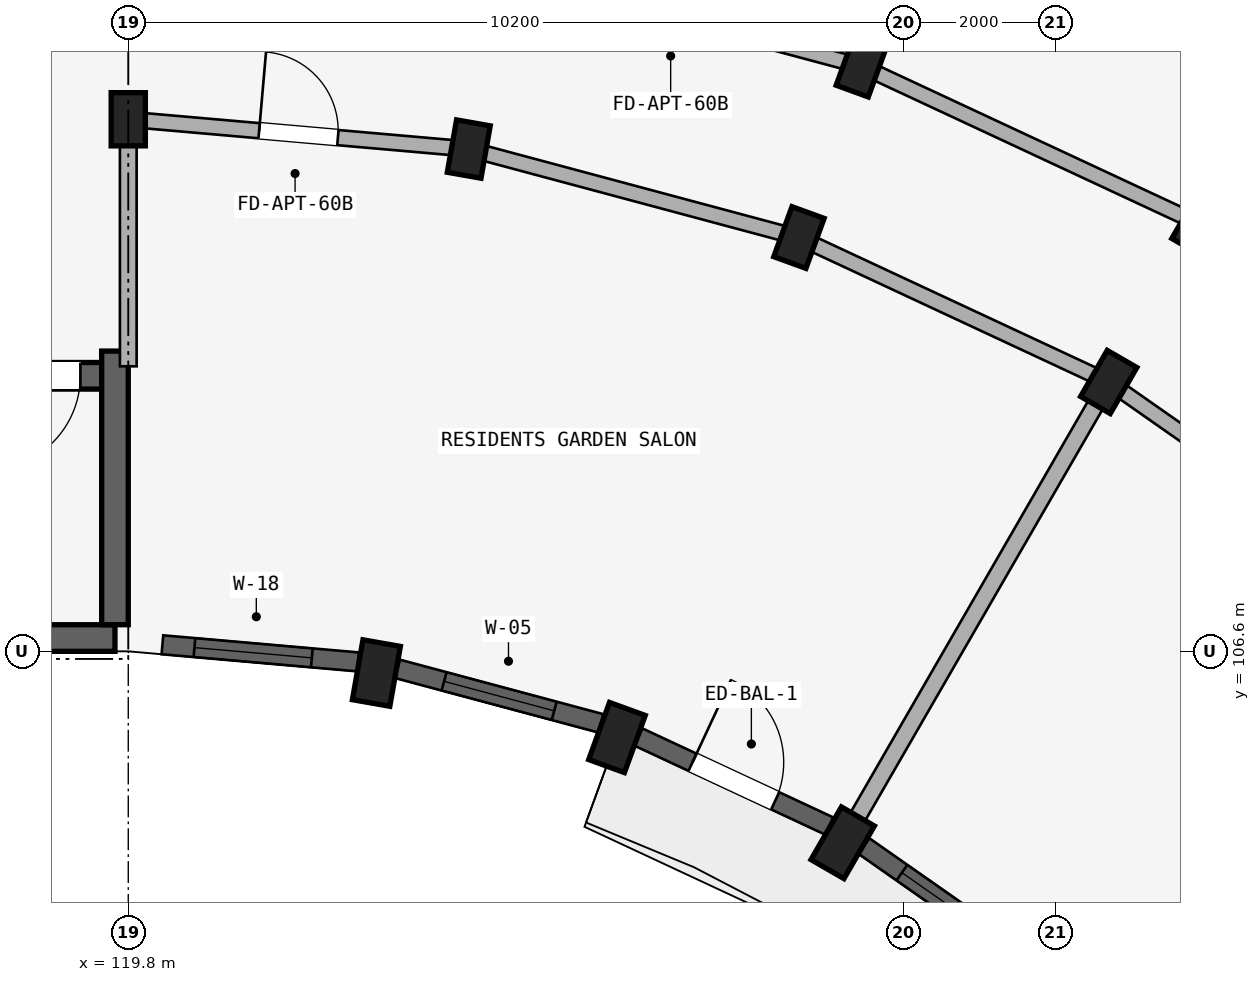
"""IFC4 building model, lengths in metres.
Left out: names, types, materials, properties, quantities, classifications, styles, units other than length and angle.
Written with IfcOpenShell. Run it as: python <this file> out.ifc"""

import sys

from ifc_helpers import new_model, si_unit, direction, frame, frame_2d, origin, origin_2d, place, context, subcontext, project, spatial, rectangle, extrude, element, fill, save


model = new_model("IFC4")
c1 = context("Model", 3, precision=1e-05, world=origin(), true_north=direction((0.0, 1.0)))
c2 = subcontext(c1, "Body", "Model", "MODEL_VIEW")
j1 = project(units=[si_unit("LENGTHUNIT", "METRE"), si_unit("PLANEANGLEUNIT", "RADIAN")], contexts=[c1])
p1 = place(None, origin())
s1 = spatial("IfcSite", under=j1, at=p1, CompositionType="ELEMENT")
p2 = place(p1, origin())
s2 = spatial("IfcBuilding", under=s1, at=p2, CompositionType="ELEMENT")
p3 = place(p2, frame((0.0, 0.0, 21.3)))
s3 = spatial("IfcBuildingStorey", under=s2, at=p3, CompositionType="ELEMENT", Elevation=21.3)
p4 = place(p3, frame((119.625, 106.775, 0.0), z_axis=(0.0, 0.0, 1.0), x_axis=(-1.0, 0.0, 0.0)))
e1 = element("IfcWall", 1, at=p4, inside=s3, PredefinedType="SHEAR", context=c2, shape_type="SweptSolid", body=[
    extrude(rectangle(XDim=8.25, YDim=0.35, at=frame_2d((4.125, 0.0))), origin(), (0.0, 0.0, 1.0), 2.93),
])
p5 = place(p3, frame((119.45, 110.225, 0.0), z_axis=(0.0, 0.0, 1.0), x_axis=(-1.0, 0.0, 0.0)))
e2 = element("IfcWall", 2, at=p5, inside=s3, PredefinedType="SHEAR", context=c2, shape_type="SweptSolid", body=[
    extrude(rectangle(XDim=7.9, YDim=0.35, at=frame_2d((3.95, 0.0))), origin(), (0.0, 0.0, 1.0), 2.93),
])
p6 = place(p5, frame((0.28, 0.0, 0.0)))
e3 = element("IfcOpeningElement", 3, at=p6, cuts=e2, PredefinedType="OPENING", context=c2, shape_type="SweptSolid", body=[
    extrude(rectangle(XDim=1.24, YDim=2.15, at=frame_2d((0.62, 1.075))), frame((0.0, 0.185, 0.0), z_axis=(0.0, -1.0, 0.0), x_axis=(1.0, 0.0, 0.0)), (0.0, 0.0, 1.0), 0.37),
])
p7 = place(p3, frame((119.625, 106.95, 0.0), z_axis=(0.0, 0.0, 1.0), x_axis=(0.0, 1.0, 0.0)))
e4 = element("IfcWall", 4, at=p7, inside=s3, PredefinedType="SHEAR", context=c2, shape_type="SweptSolid", body=[
    extrude(rectangle(XDim=3.6, YDim=0.35, at=frame_2d((1.8, 0.0))), origin(), (0.0, 0.0, 1.0), 2.93),
])
p8 = place(p3, frame((119.8, 113.6, 0.0), z_axis=(0.0, 0.0, 1.0), x_axis=(1.0, 0.0, 0.0)))
e5 = element("IfcColumn", 5, at=p8, inside=s3, PredefinedType="COLUMN", context=c2, shape_type="SweptSolid", body=[
    extrude(rectangle(XDim=0.45, YDim=0.7, at=origin_2d()), origin(), (0.0, 0.0, 1.0), 2.93),
])
p9 = place(p3, frame((123.065, 106.314, 0.0), z_axis=(0.0, 0.0, 1.0), x_axis=(-0.984807753012, 0.173648177667, 0.0)))
e6 = element("IfcColumn", 6, at=p9, inside=s3, PredefinedType="COLUMN", context=c2, shape_type="SweptSolid", body=[
    extrude(rectangle(XDim=0.5, YDim=0.8, at=origin_2d()), origin(), (0.0, 0.0, 1.0), 2.93),
])
p10 = place(p3, frame((124.28, 113.208, 0.0), z_axis=(0.0, 0.0, 1.0), x_axis=(-0.984807753012, 0.173648177667, 0.0)))
e7 = element("IfcColumn", 7, at=p10, inside=s3, PredefinedType="COLUMN", context=c2, shape_type="SweptSolid", body=[
    extrude(rectangle(XDim=0.45, YDim=0.7, at=origin_2d()), origin(), (0.0, 0.0, 1.0), 2.93),
])
p11 = place(p3, frame((126.23, 105.466, 0.0), z_axis=(0.0, 0.0, 1.0), x_axis=(-0.939692620786, 0.342020143326, 0.0)))
e8 = element("IfcColumn", 8, at=p11, inside=s3, PredefinedType="COLUMN", context=c2, shape_type="SweptSolid", body=[
    extrude(rectangle(XDim=0.5, YDim=0.8, at=origin_2d()), origin(), (0.0, 0.0, 1.0), 2.93),
])
for number, where, z_axis, x_axis in (
    (9, (128.624, 112.044, 0.0), (0.0, 0.0, 1.0), (-0.94, 0.342, 0.0)),
    (10, (129.445, 114.299, 0.0), (0.0, 0.0, 1.0), (-0.94, 0.342, 0.0)),
):
    element("IfcColumn", number, at=place(p3, frame(where, z_axis=z_axis, x_axis=x_axis)), inside=s3, PredefinedType="COLUMN", context=c2, shape_type="SweptSolid", body=[
        extrude(rectangle(XDim=0.45, YDim=0.7, at=origin_2d()), origin(), (0.0, 0.0, 1.0), 2.93),
    ])
p12 = place(p3, frame((129.2, 104.081, 0.0), z_axis=(0.0, 0.0, 1.0), x_axis=(-0.866025403784, 0.5, 0.0)))
e11 = element("IfcColumn", 11, at=p12, inside=s3, PredefinedType="COLUMN", context=c2, shape_type="SweptSolid", body=[
    extrude(rectangle(XDim=0.5, YDim=0.8, at=origin_2d()), origin(), (0.0, 0.0, 1.0), 2.93),
])
for number, where, z_axis, x_axis in (
    (12, (132.7, 110.144, 0.0), (0.0, 0.0, 1.0), (-0.866, 0.5, 0.0)),
    (13, (133.9, 112.222, 0.0), (0.0, 0.0, 1.0), (-0.866, 0.5, 0.0)),
):
    element("IfcColumn", number, at=place(p3, frame(where, z_axis=z_axis, x_axis=x_axis)), inside=s3, PredefinedType="COLUMN", context=c2, shape_type="SweptSolid", body=[
        extrude(rectangle(XDim=0.45, YDim=0.7, at=origin_2d()), origin(), (0.0, 0.0, 1.0), 2.93),
    ])
p13 = place(p3, frame((119.8, 113.6, 0.0), z_axis=(0.0, 0.0, 1.0), x_axis=(0.996191949488, -0.087187153726, 0.0)))
e14 = element("IfcWall", 14, at=p13, inside=s3, PredefinedType="STANDARD", context=c2, shape_type="SweptSolid", body=[
    extrude(rectangle(XDim=4.497, YDim=0.2, at=frame_2d((2.249, 0.0))), origin(), (0.0, 0.0, 1.0), 2.372),
])
p14 = place(p13, frame((1.729, 0.0, 0.0)))
e15 = element("IfcOpeningElement", 15, at=p14, cuts=e14, PredefinedType="OPENING", context=c2, shape_type="SweptSolid", body=[
    extrude(rectangle(XDim=1.04, YDim=2.15, at=frame_2d((0.52, 1.075))), frame((0.0, 0.11, 0.0), z_axis=(0.0, -1.0, 0.0), x_axis=(1.0, 0.0, 0.0)), (0.0, 0.0, 1.0), 0.22),
])
p15 = place(p3, frame((124.28, 113.208, 0.0), z_axis=(0.0, 0.0, 1.0), x_axis=(0.965934240054, -0.258787642463, 0.0)))
e16 = element("IfcWall", 16, at=p15, inside=s3, PredefinedType="STANDARD", context=c2, shape_type="SweptSolid", body=[
    extrude(rectangle(XDim=4.497, YDim=0.2, at=frame_2d((2.249, 0.0))), origin(), (0.0, 0.0, 1.0), 2.372),
])
p16 = place(p3, frame((124.697, 115.572, 0.0), z_axis=(0.0, 0.0, 1.0), x_axis=(0.965930095386, -0.258803112091, 0.0)))
e17 = element("IfcWall", 17, at=p16, inside=s3, PredefinedType="STANDARD", context=c2, shape_type="SweptSolid", body=[
    extrude(rectangle(XDim=4.916, YDim=0.2, at=frame_2d((2.458, 0.0))), origin(), (0.0, 0.0, 1.0), 2.372),
])
p17 = place(p16, frame((1.938, 0.0, 0.0)))
e18 = element("IfcOpeningElement", 18, at=p17, cuts=e17, PredefinedType="OPENING", context=c2, shape_type="SweptSolid", body=[
    extrude(rectangle(XDim=1.04, YDim=2.15, at=frame_2d((0.52, 1.075))), frame((0.0, 0.11, 0.0), z_axis=(0.0, -1.0, 0.0), x_axis=(1.0, 0.0, 0.0)), (0.0, 0.0, 1.0), 0.22),
])
p18 = place(p3, frame((128.624, 112.044, 0.0), z_axis=(0.0, 0.0, 1.0), x_axis=(0.906307919131, -0.422617978463, 0.0)))
e19 = element("IfcWall", 19, at=p18, inside=s3, PredefinedType="STANDARD", context=c2, shape_type="SweptSolid", body=[
    extrude(rectangle(XDim=4.497, YDim=0.2, at=frame_2d((2.249, 0.0))), origin(), (0.0, 0.0, 1.0), 2.372),
])
p19 = place(p3, frame((129.445, 114.299, 0.0), z_axis=(0.0, 0.0, 1.0), x_axis=(0.906302381024, -0.422629854778, 0.0)))
e20 = element("IfcWall", 20, at=p19, inside=s3, PredefinedType="STANDARD", context=c2, shape_type="SweptSolid", body=[
    extrude(rectangle(XDim=4.915, YDim=0.2, at=frame_2d((2.458, 0.0))), origin(), (0.0, 0.0, 1.0), 2.372),
])
p20 = place(p3, frame((132.7, 110.144, 0.0), z_axis=(0.0, 0.0, 1.0), x_axis=(0.819155404658, -0.573571637217, 0.0)))
e21 = element("IfcWall", 21, at=p20, inside=s3, PredefinedType="STANDARD", context=c2, shape_type="SweptSolid", body=[
    extrude(rectangle(XDim=4.497, YDim=0.2, at=frame_2d((2.249, 0.0))), origin(), (0.0, 0.0, 1.0), 2.372),
])
p21 = place(p20, frame((1.709, 0.0, 0.0)))
e22 = element("IfcOpeningElement", 22, at=p21, cuts=e21, PredefinedType="OPENING", context=c2, shape_type="SweptSolid", body=[
    extrude(rectangle(XDim=1.08, YDim=2.15, at=frame_2d((0.54, 1.075))), frame((0.0, 0.11, 0.0), z_axis=(0.0, -1.0, 0.0), x_axis=(1.0, 0.0, 0.0)), (0.0, 0.0, 1.0), 0.22),
])
p22 = place(p3, frame((119.8, 110.35, 0.0), z_axis=(0.0, 0.0, 1.0), x_axis=(0.0, 1.0, 0.0)))
e23 = element("IfcWall", 23, at=p22, inside=s3, PredefinedType="STANDARD", context=c2, shape_type="SweptSolid", body=[
    extrude(rectangle(XDim=3.2, YDim=0.22, at=frame_2d((1.6, 0.0))), origin(), (0.0, 0.0, 1.0), 2.372),
])
p23 = place(p3, frame((129.479, 114.393, 0.0), z_axis=(0.0, 0.0, 1.0), x_axis=(0.342022120477, 0.939691901159, 0.0)))
e24 = element("IfcWall", 24, at=p23, inside=s3, PredefinedType="PARTITIONING", context=c2, shape_type="SweptSolid", body=[
    extrude(rectangle(XDim=17.42, YDim=0.15, at=frame_2d((8.71, 0.0))), origin(), (0.0, 0.0, 1.0), 2.372),
])
p24 = place(p23, frame((4.45, 0.0, 0.0)))
e25 = element("IfcOpeningElement", 25, at=p24, cuts=e24, PredefinedType="OPENING", context=c2, shape_type="SweptSolid", body=[
    extrude(rectangle(XDim=0.8, YDim=2.1, at=frame_2d((0.4, 1.05))), frame((0.0, 0.085, 0.0), z_axis=(0.0, -1.0, 0.0), x_axis=(1.0, 0.0, 0.0)), (0.0, 0.0, 1.0), 0.17),
])
p25 = place(p3, frame((129.3, 104.254, 0.0), z_axis=(0.0, 0.0, 1.0), x_axis=(0.499997969693, 0.866026575979, 0.0)))
e26 = element("IfcWall", 26, at=p25, inside=s3, PredefinedType="STANDARD", context=c2, shape_type="SweptSolid", body=[
    extrude(rectangle(XDim=6.75, YDim=0.22, at=frame_2d((3.375, 0.0))), origin(), (0.0, 0.0, 1.0), 2.372),
])
p26 = place(p3, frame((120.249, 106.686, 0.0), z_axis=(0.0, 0.0, 1.0), x_axis=(0.996188278786, -0.087229084652, 0.0)))
e27 = element("IfcWall", 27, at=p26, inside=s3, PredefinedType="STANDARD", context=c2, shape_type="SweptSolid", body=[
    extrude(rectangle(XDim=2.583, YDim=0.25, at=frame_2d((1.292, 0.0))), origin(), (0.0, 0.0, 1.0), 2.472),
])
p27 = place(p26, frame((0.424, 0.0, 0.672)))
e28 = element("IfcOpeningElement", 28, at=p27, cuts=e27, PredefinedType="OPENING", context=c2, shape_type="SweptSolid", body=[
    extrude(rectangle(XDim=1.55, YDim=1.6, at=frame_2d((0.775, 0.8))), frame((0.0, 0.135, 0.0), z_axis=(0.0, -1.0, 0.0), x_axis=(1.0, 0.0, 0.0)), (0.0, 0.0, 1.0), 0.27),
])
p28 = place(p3, frame((123.342, 106.369, 0.0), z_axis=(0.0, 0.0, 1.0), x_axis=(0.965935855992, -0.25878161084, 0.0)))
e29 = element("IfcWall", 29, at=p28, inside=s3, PredefinedType="STANDARD", context=c2, shape_type="SweptSolid", body=[
    extrude(rectangle(XDim=2.77, YDim=0.25, at=frame_2d((1.385, 0.0))), origin(), (0.0, 0.0, 1.0), 2.472),
])
p29 = place(p28, frame((0.635, 0.0, 0.622)))
e30 = element("IfcOpeningElement", 30, at=p29, cuts=e29, PredefinedType="OPENING", context=c2, shape_type="SweptSolid", body=[
    extrude(rectangle(XDim=1.5, YDim=1.65, at=frame_2d((0.75, 0.825))), frame((0.0, 0.135, 0.0), z_axis=(0.0, -1.0, 0.0), x_axis=(1.0, 0.0, 0.0)), (0.0, 0.0, 1.0), 0.27),
])
p30 = place(p3, frame((126.513, 105.472, 0.0), z_axis=(0.0, 0.0, 1.0), x_axis=(0.906293449611, -0.422649007088, 0.0)))
e31 = element("IfcWall", 31, at=p30, inside=s3, PredefinedType="STANDARD", context=c2, shape_type="SweptSolid", body=[
    extrude(rectangle(XDim=2.77, YDim=0.25, at=frame_2d((1.385, 0.0))), origin(), (0.0, 0.0, 1.0), 2.472),
])
p31 = place(p30, frame((0.785, 0.0, 0.0)))
e32 = element("IfcOpeningElement", 32, at=p31, cuts=e31, PredefinedType="OPENING", context=c2, shape_type="SweptSolid", body=[
    extrude(rectangle(XDim=1.2, YDim=2.15, at=frame_2d((0.6, 1.075))), frame((0.0, 0.135, 0.0), z_axis=(0.0, -1.0, 0.0), x_axis=(1.0, 0.0, 0.0)), (0.0, 0.0, 1.0), 0.27),
])
p32 = place(p3, frame((129.479, 104.038, 0.0), z_axis=(0.0, 0.0, 1.0), x_axis=(0.819111815273, -0.573633885053, 0.0)))
e33 = element("IfcWall", 33, at=p32, inside=s3, PredefinedType="STANDARD", context=c2, shape_type="SweptSolid", body=[
    extrude(rectangle(XDim=2.77, YDim=0.25, at=frame_2d((1.385, 0.0))), origin(), (0.0, 0.0, 1.0), 2.472),
])
p33 = place(p32, frame((0.61, 0.0, 0.672)))
e34 = element("IfcOpeningElement", 34, at=p33, cuts=e33, PredefinedType="OPENING", context=c2, shape_type="SweptSolid", body=[
    extrude(rectangle(XDim=1.55, YDim=1.6, at=frame_2d((0.775, 0.8))), frame((0.0, 0.135, 0.0), z_axis=(0.0, -1.0, 0.0), x_axis=(1.0, 0.0, 0.0)), (0.0, 0.0, 1.0), 0.27),
])
p34 = place(p27, origin())
e35 = element("IfcWindow", 35, at=p34, inside=s3, PartitioningType="DOUBLE_PANEL_VERTICAL", PredefinedType="WINDOW", context=c2, shape_type="SweptSolid", body=[
    extrude(rectangle(XDim=1.55, YDim=1.6, at=frame_2d((0.775, 0.8))), frame((0.0, 0.03, 0.0), z_axis=(0.0, -1.0, 0.0), x_axis=(1.0, 0.0, 0.0)), (0.0, 0.0, 1.0), 0.06),
])
fill(e28, e35)
p35 = place(p29, origin())
e36 = element("IfcWindow", 36, at=p35, inside=s3, PartitioningType="DOUBLE_PANEL_VERTICAL", PredefinedType="WINDOW", context=c2, shape_type="SweptSolid", body=[
    extrude(rectangle(XDim=1.5, YDim=1.65, at=frame_2d((0.75, 0.825))), frame((0.0, 0.03, 0.0), z_axis=(0.0, -1.0, 0.0), x_axis=(1.0, 0.0, 0.0)), (0.0, 0.0, 1.0), 0.06),
])
fill(e30, e36)
p36 = place(p33, origin())
e37 = element("IfcWindow", 37, at=p36, inside=s3, PartitioningType="DOUBLE_PANEL_VERTICAL", PredefinedType="WINDOW", context=c2, shape_type="SweptSolid", body=[
    extrude(rectangle(XDim=1.55, YDim=1.6, at=frame_2d((0.775, 0.8))), frame((0.0, 0.03, 0.0), z_axis=(0.0, -1.0, 0.0), x_axis=(1.0, 0.0, 0.0)), (0.0, 0.0, 1.0), 0.06),
])
fill(e34, e37)
p37 = place(p6, origin())
e38 = element("IfcDoor", 38, at=p37, inside=s3, OperationType="SINGLE_SWING_RIGHT", PredefinedType="DOOR", context=c2, shape_type="SweptSolid", body=[
    extrude(rectangle(XDim=1.24, YDim=2.15, at=frame_2d((0.62, 1.075))), frame((0.0, 0.025, 0.0), z_axis=(0.0, -1.0, 0.0), x_axis=(1.0, 0.0, 0.0)), (0.0, 0.0, 1.0), 0.05),
])
fill(e3, e38)
p38 = place(p14, origin())
e39 = element("IfcDoor", 39, at=p38, inside=s3, OperationType="SINGLE_SWING_LEFT", PredefinedType="DOOR", context=c2, shape_type="SweptSolid", body=[
    extrude(rectangle(XDim=1.04, YDim=2.15, at=frame_2d((0.52, 1.075))), frame((0.0, 0.025, 0.0), z_axis=(0.0, -1.0, 0.0), x_axis=(1.0, 0.0, 0.0)), (0.0, 0.0, 1.0), 0.05),
])
fill(e15, e39)
p39 = place(p31, frame((1.2, 0.0, 0.0), z_axis=(0.0, 0.0, 1.0), x_axis=(-1.0, 0.0, 0.0)))
e40 = element("IfcDoor", 40, at=p39, inside=s3, OperationType="SINGLE_SWING_RIGHT", PredefinedType="DOOR", context=c2, shape_type="SweptSolid", body=[
    extrude(rectangle(XDim=1.2, YDim=2.15, at=frame_2d((0.6, 1.075))), frame((0.0, 0.025, 0.0), z_axis=(0.0, -1.0, 0.0), x_axis=(1.0, 0.0, 0.0)), (0.0, 0.0, 1.0), 0.05),
])
fill(e32, e40)
save(model, sys.argv[1])
